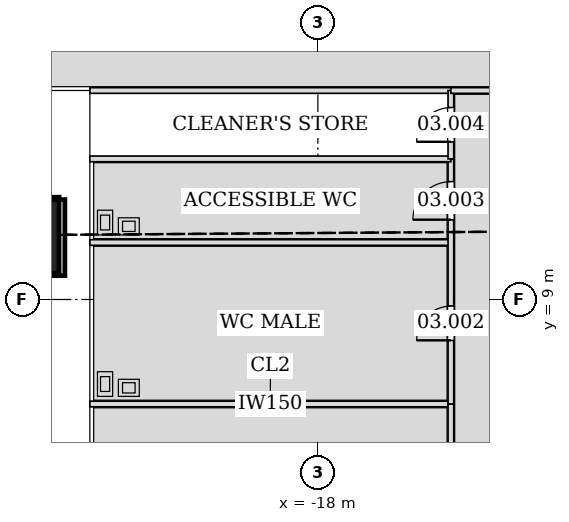
"""IFC4 building model, lengths in metres.
Left out: names, types, materials, properties, quantities, classifications, styles, units other than length and angle.
Written with IfcOpenShell. Run it as: python <this file> out.ifc"""

import sys

from ifc_helpers import new_model, si_unit, direction, frame, frame_2d, origin, origin_2d, place, context, subcontext, project, spatial, rectangle, hollow_rectangle, extrude, element, fill, save


model = new_model("IFC4")
c1 = context("Model", 3, precision=1e-05, world=origin(), true_north=direction((0.0, 1.0)))
c2 = subcontext(c1, "Body", "Model", "MODEL_VIEW")
j1 = project(units=[si_unit("LENGTHUNIT", "METRE"), si_unit("PLANEANGLEUNIT", "RADIAN")], contexts=[c1])
p1 = place(None, origin())
s1 = spatial("IfcSite", under=j1, at=p1, CompositionType="ELEMENT")
p2 = place(p1, origin())
s2 = spatial("IfcBuilding", under=s1, at=p2, CompositionType="ELEMENT")
p3 = place(p2, frame((0.0, 0.0, 18.6)))
s3 = spatial("IfcBuildingStorey", under=s2, at=p3, CompositionType="ELEMENT", Elevation=18.6)
p4 = place(p3, frame((-25.81, 10.691, 0.0), z_axis=(0.028289472832, -0.011704430453, 0.999531246152), x_axis=(0.3823083337, 0.92403481427, 0.0)))
e1 = element("IfcColumn", 1, at=p4, inside=s3, PredefinedType="COLUMN", context=c2, shape_type="SweptSolid", body=[
    extrude(hollow_rectangle(XDim=2.0, YDim=2.0, WallThickness=0.09, at=origin_2d()), origin(), (0.0, 0.0, 1.0), 5.402),
])
p5 = place(p3, frame((-14.788, 35.876, 0.0), z_axis=(0.0, 0.0, 1.0), x_axis=(-0.707106781187, -0.707106781187, 0.0)))
e2 = element("IfcWall", 2, at=p5, inside=s3, PredefinedType="SOLIDWALL", context=c2, shape_type="SweptSolid", body=[
    extrude(rectangle(XDim=29.823, YDim=0.35, at=frame_2d((14.912, 0.0))), origin(), (0.0, 0.0, 1.0), 5.1),
])
p6 = place(p5, frame((0.822, 0.0, 0.9)))
e3 = element("IfcOpeningElement", 3, at=p6, cuts=e2, PredefinedType="OPENING", context=c2, shape_type="SweptSolid", body=[
    extrude(rectangle(XDim=1.2, YDim=3.6, at=frame_2d((0.6, 1.8))), frame((0.0, 0.185, 0.0), z_axis=(0.0, -1.0, 0.0), x_axis=(1.0, 0.0, 0.0)), (0.0, 0.0, 1.0), 0.37),
])
p7 = place(p5, frame((3.52, 0.0, 0.9)))
e4 = element("IfcOpeningElement", 4, at=p7, cuts=e2, PredefinedType="OPENING", context=c2, shape_type="SweptSolid", body=[
    extrude(rectangle(XDim=1.2, YDim=3.6, at=frame_2d((0.6, 1.8))), frame((0.0, 0.185, 0.0), z_axis=(0.0, -1.0, 0.0), x_axis=(1.0, 0.0, 0.0)), (0.0, 0.0, 1.0), 0.37),
])
p8 = place(p5, frame((6.218, 0.0, 0.9)))
e5 = element("IfcOpeningElement", 5, at=p8, cuts=e2, PredefinedType="OPENING", context=c2, shape_type="SweptSolid", body=[
    extrude(rectangle(XDim=1.2, YDim=3.6, at=frame_2d((0.6, 1.8))), frame((0.0, 0.185, 0.0), z_axis=(0.0, -1.0, 0.0), x_axis=(1.0, 0.0, 0.0)), (0.0, 0.0, 1.0), 0.37),
])
p9 = place(p5, frame((8.916, 0.0, 0.9)))
e6 = element("IfcOpeningElement", 6, at=p9, cuts=e2, PredefinedType="OPENING", context=c2, shape_type="SweptSolid", body=[
    extrude(rectangle(XDim=1.2, YDim=3.6, at=frame_2d((0.6, 1.8))), frame((0.0, 0.185, 0.0), z_axis=(0.0, -1.0, 0.0), x_axis=(1.0, 0.0, 0.0)), (0.0, 0.0, 1.0), 0.37),
])
p10 = place(p5, frame((11.614, 0.0, 0.9)))
e7 = element("IfcOpeningElement", 7, at=p10, cuts=e2, PredefinedType="OPENING", context=c2, shape_type="SweptSolid", body=[
    extrude(rectangle(XDim=1.2, YDim=3.6, at=frame_2d((0.6, 1.8))), frame((0.0, 0.185, 0.0), z_axis=(0.0, -1.0, 0.0), x_axis=(1.0, 0.0, 0.0)), (0.0, 0.0, 1.0), 0.37),
])
p11 = place(p5, frame((14.312, 0.0, 0.9)))
e8 = element("IfcOpeningElement", 8, at=p11, cuts=e2, PredefinedType="OPENING", context=c2, shape_type="SweptSolid", body=[
    extrude(rectangle(XDim=1.2, YDim=3.6, at=frame_2d((0.6, 1.8))), frame((0.0, 0.185, 0.0), z_axis=(0.0, -1.0, 0.0), x_axis=(1.0, 0.0, 0.0)), (0.0, 0.0, 1.0), 0.37),
])
p12 = place(p5, frame((17.01, 0.0, 0.9)))
e9 = element("IfcOpeningElement", 9, at=p12, cuts=e2, PredefinedType="OPENING", context=c2, shape_type="SweptSolid", body=[
    extrude(rectangle(XDim=1.2, YDim=3.6, at=frame_2d((0.6, 1.8))), frame((0.0, 0.185, 0.0), z_axis=(0.0, -1.0, 0.0), x_axis=(1.0, 0.0, 0.0)), (0.0, 0.0, 1.0), 0.37),
])
p13 = place(p5, frame((19.708, 0.0, 0.9)))
e10 = element("IfcOpeningElement", 10, at=p13, cuts=e2, PredefinedType="OPENING", context=c2, shape_type="SweptSolid", body=[
    extrude(rectangle(XDim=1.2, YDim=3.6, at=frame_2d((0.6, 1.8))), frame((0.0, 0.185, 0.0), z_axis=(0.0, -1.0, 0.0), x_axis=(1.0, 0.0, 0.0)), (0.0, 0.0, 1.0), 0.37),
])
p14 = place(p5, frame((22.406, 0.0, 0.9)))
e11 = element("IfcOpeningElement", 11, at=p14, cuts=e2, PredefinedType="OPENING", context=c2, shape_type="SweptSolid", body=[
    extrude(rectangle(XDim=1.2, YDim=3.6, at=frame_2d((0.6, 1.8))), frame((0.0, 0.185, 0.0), z_axis=(0.0, -1.0, 0.0), x_axis=(1.0, 0.0, 0.0)), (0.0, 0.0, 1.0), 0.37),
])
p15 = place(p5, frame((25.104, 0.0, 0.9)))
e12 = element("IfcOpeningElement", 12, at=p15, cuts=e2, PredefinedType="OPENING", context=c2, shape_type="SweptSolid", body=[
    extrude(rectangle(XDim=1.2, YDim=3.6, at=frame_2d((0.6, 1.8))), frame((0.0, 0.185, 0.0), z_axis=(0.0, -1.0, 0.0), x_axis=(1.0, 0.0, 0.0)), (0.0, 0.0, 1.0), 0.37),
])
p16 = place(p5, frame((27.802, 0.0, 0.9)))
e13 = element("IfcOpeningElement", 13, at=p16, cuts=e2, PredefinedType="OPENING", context=c2, shape_type="SweptSolid", body=[
    extrude(rectangle(XDim=1.2, YDim=3.6, at=frame_2d((0.6, 1.8))), frame((0.0, 0.185, 0.0), z_axis=(0.0, -1.0, 0.0), x_axis=(1.0, 0.0, 0.0)), (0.0, 0.0, 1.0), 0.37),
])
p17 = place(p3, frame((-14.5, 6.25, 0.0), z_axis=(0.0, 0.0, 1.0), x_axis=(-1.0, 0.0, 0.0)))
e14 = element("IfcWall", 14, at=p17, inside=s3, PredefinedType="PARTITIONING", context=c2, shape_type="SweptSolid", body=[
    extrude(rectangle(XDim=9.5, YDim=0.15, at=frame_2d((4.75, 0.0))), origin(), (0.0, 0.0, 1.0), 4.244),
])
p18 = place(p3, frame((-14.5, 2.0, 0.0), z_axis=(0.0, 0.0, 1.0), x_axis=(0.0, 1.0, 0.0)))
e15 = element("IfcWall", 15, at=p18, inside=s3, PredefinedType="PARTITIONING", context=c2, shape_type="SweptSolid", body=[
    extrude(rectangle(XDim=4.25, YDim=0.15, at=frame_2d((2.125, 0.0))), origin(), (0.0, 0.0, 1.0), 5.1),
])
p19 = place(p18, frame((1.675, 0.0, 0.0)))
e16 = element("IfcOpeningElement", 16, at=p19, cuts=e15, PredefinedType="OPENING", context=c2, shape_type="SweptSolid", body=[
    extrude(rectangle(XDim=0.9, YDim=2.1, at=frame_2d((0.45, 1.05))), frame((0.0, 0.085, 0.0), z_axis=(0.0, -1.0, 0.0), x_axis=(1.0, 0.0, 0.0)), (0.0, 0.0, 1.0), 0.17),
])
p20 = place(p3, frame((-14.5, 10.5, 0.0), z_axis=(0.0, 0.0, 1.0), x_axis=(-1.0, 0.0, 0.0)))
e17 = element("IfcWall", 17, at=p20, inside=s3, PredefinedType="PARTITIONING", context=c2, shape_type="SweptSolid", body=[
    extrude(rectangle(XDim=9.5, YDim=0.15, at=frame_2d((4.75, 0.0))), origin(), (0.0, 0.0, 1.0), 3.79),
])
p21 = place(p3, frame((-14.5, 6.25, 0.0), z_axis=(0.0, 0.0, 1.0), x_axis=(0.0, 1.0, 0.0)))
e18 = element("IfcWall", 18, at=p21, inside=s3, PredefinedType="PARTITIONING", context=c2, shape_type="SweptSolid", body=[
    extrude(rectangle(XDim=6.45, YDim=0.15, at=frame_2d((3.225, 0.0))), origin(), (0.0, 0.0, 1.0), 3.79),
])
p22 = place(p21, frame((1.675, 0.0, 0.0)))
e19 = element("IfcOpeningElement", 19, at=p22, cuts=e18, PredefinedType="OPENING", context=c2, shape_type="SweptSolid", body=[
    extrude(rectangle(XDim=0.9, YDim=2.1, at=frame_2d((0.45, 1.05))), frame((0.0, 0.085, 0.0), z_axis=(0.0, -1.0, 0.0), x_axis=(1.0, 0.0, 0.0)), (0.0, 0.0, 1.0), 0.17),
])
p23 = place(p21, frame((4.85, 0.0, 0.0)))
e20 = element("IfcOpeningElement", 20, at=p23, cuts=e18, PredefinedType="OPENING", context=c2, shape_type="SweptSolid", body=[
    extrude(rectangle(XDim=1.0, YDim=2.1, at=frame_2d((0.5, 1.05))), frame((0.0, 0.085, 0.0), z_axis=(0.0, -1.0, 0.0), x_axis=(1.0, 0.0, 0.0)), (0.0, 0.0, 1.0), 0.17),
])
p24 = place(p3, frame((-14.5, 12.7, 0.0), z_axis=(0.0, 0.0, 1.0), x_axis=(-1.0, 0.0, 0.0)))
e21 = element("IfcWall", 21, at=p24, inside=s3, PredefinedType="PARTITIONING", context=c2, shape_type="SweptSolid", body=[
    extrude(rectangle(XDim=9.5, YDim=0.15, at=frame_2d((4.75, 0.0))), origin(), (0.0, 0.0, 1.0), 4.335),
])
p25 = place(p3, frame((-14.5, 14.5, 0.0), z_axis=(0.0, 0.0, 1.0), x_axis=(-1.0, 0.0, 0.0)))
e22 = element("IfcWall", 22, at=p25, inside=s3, PredefinedType="PARTITIONING", context=c2, shape_type="SweptSolid", body=[
    extrude(rectangle(XDim=9.5, YDim=0.15, at=frame_2d((4.75, 0.0))), origin(), (0.0, 0.0, 1.0), 4.13),
])
p26 = place(p3, frame((-14.5, 12.7, 0.0), z_axis=(0.0, 0.0, 1.0), x_axis=(0.0, 1.0, 0.0)))
e23 = element("IfcWall", 23, at=p26, inside=s3, PredefinedType="PARTITIONING", context=c2, shape_type="SweptSolid", body=[
    extrude(rectangle(XDim=1.8, YDim=0.15, at=frame_2d((0.9, 0.0))), origin(), (0.0, 0.0, 1.0), 4.13),
])
p27 = place(p26, frame((0.45, 0.0, 0.0)))
e24 = element("IfcOpeningElement", 24, at=p27, cuts=e23, PredefinedType="OPENING", context=c2, shape_type="SweptSolid", body=[
    extrude(rectangle(XDim=0.9, YDim=2.1, at=frame_2d((0.45, 1.05))), frame((0.0, 0.085, 0.0), z_axis=(0.0, -1.0, 0.0), x_axis=(1.0, 0.0, 0.0)), (0.0, 0.0, 1.0), 0.17),
])
p28 = place(p3, frame((-14.501, 14.5, 0.0), z_axis=(0.0, 0.0, 1.0), x_axis=(1.0, 0.0, 0.0)))
e25 = element("IfcWall", 25, at=p28, inside=s3, PredefinedType="PARTITIONING", context=c2, shape_type="SweptSolid", body=[
    extrude(rectangle(XDim=29.002, YDim=0.15, at=frame_2d((14.501, 0.0))), origin(), (0.0, 0.0, 1.0), 3.79),
])
p29 = place(p28, frame((6.351, 0.0, 0.0)))
e26 = element("IfcOpeningElement", 26, at=p29, cuts=e25, PredefinedType="OPENING", context=c2, shape_type="SweptSolid", body=[
    extrude(rectangle(XDim=1.8, YDim=2.4, at=frame_2d((0.9, 1.2))), frame((0.0, 0.085, 0.0), z_axis=(0.0, -1.0, 0.0), x_axis=(1.0, 0.0, 0.0)), (0.0, 0.0, 1.0), 0.17),
])
p30 = place(p28, frame((13.601, 0.0, 0.0)))
e27 = element("IfcOpeningElement", 27, at=p30, cuts=e25, PredefinedType="OPENING", context=c2, shape_type="SweptSolid", body=[
    extrude(rectangle(XDim=1.8, YDim=2.4, at=frame_2d((0.9, 1.2))), frame((0.0, 0.085, 0.0), z_axis=(0.0, -1.0, 0.0), x_axis=(1.0, 0.0, 0.0)), (0.0, 0.0, 1.0), 0.17),
])
p31 = place(p28, frame((20.852, 0.0, 0.0)))
e28 = element("IfcOpeningElement", 28, at=p31, cuts=e25, PredefinedType="OPENING", context=c2, shape_type="SweptSolid", body=[
    extrude(rectangle(XDim=1.8, YDim=2.4, at=frame_2d((0.9, 1.2))), frame((0.0, 0.085, 0.0), z_axis=(0.0, -1.0, 0.0), x_axis=(1.0, 0.0, 0.0)), (0.0, 0.0, 1.0), 0.17),
])
p32 = place(p22, origin())
e29 = element("IfcDoor", 29, at=p32, inside=s3, OperationType="SINGLE_SWING_LEFT", PredefinedType="DOOR", context=c2, shape_type="SweptSolid", body=[
    extrude(rectangle(XDim=0.9, YDim=2.1, at=frame_2d((0.45, 1.05))), frame((0.0, 0.025, 0.0), z_axis=(0.0, -1.0, 0.0), x_axis=(1.0, 0.0, 0.0)), (0.0, 0.0, 1.0), 0.05),
])
fill(e19, e29)
p33 = place(p23, origin())
e30 = element("IfcDoor", 30, at=p33, inside=s3, OperationType="SINGLE_SWING_LEFT", PredefinedType="DOOR", context=c2, shape_type="SweptSolid", body=[
    extrude(rectangle(XDim=1.0, YDim=2.1, at=frame_2d((0.5, 1.05))), frame((0.0, 0.025, 0.0), z_axis=(0.0, -1.0, 0.0), x_axis=(1.0, 0.0, 0.0)), (0.0, 0.0, 1.0), 0.05),
])
fill(e20, e30)
p34 = place(p27, origin())
e31 = element("IfcDoor", 31, at=p34, inside=s3, OperationType="SINGLE_SWING_LEFT", PredefinedType="DOOR", context=c2, shape_type="SweptSolid", body=[
    extrude(rectangle(XDim=0.9, YDim=2.1, at=frame_2d((0.45, 1.05))), frame((0.0, 0.025, 0.0), z_axis=(0.0, -1.0, 0.0), x_axis=(1.0, 0.0, 0.0)), (0.0, 0.0, 1.0), 0.05),
])
fill(e24, e31)
save(model, sys.argv[1])
